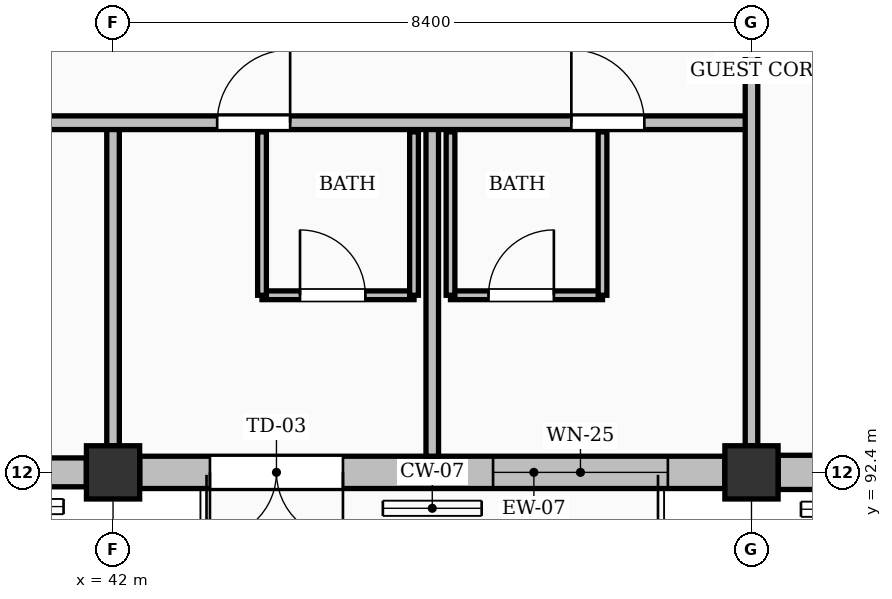
"""IFC4 building model, lengths in metres.
Left out: names, types, materials, properties, quantities, classifications, styles, units other than length and angle.
Written with IfcOpenShell. Run it as: python <this file> out.ifc"""

import sys

from ifc_helpers import new_model, si_unit, direction, frame, frame_2d, origin, origin_2d, place, context, subcontext, project, spatial, rectangle, extrude, element, fill, save


model = new_model("IFC4")
c1 = context("Model", 3, precision=1e-05, world=origin(), true_north=direction((0.0, 1.0)))
c2 = subcontext(c1, "Body", "Model", "MODEL_VIEW")
j1 = project(units=[si_unit("LENGTHUNIT", "METRE"), si_unit("PLANEANGLEUNIT", "RADIAN")], contexts=[c1])
p1 = place(None, origin())
s1 = spatial("IfcSite", under=j1, at=p1, CompositionType="ELEMENT")
p2 = place(p1, origin())
s2 = spatial("IfcBuilding", under=s1, at=p2, CompositionType="ELEMENT")
p3 = place(p2, frame((0.0, 0.0, 25.2)))
s3 = spatial("IfcBuildingStorey", under=s2, at=p3, CompositionType="ELEMENT", Elevation=25.2)
for number, where, z_axis, x_axis in (
    (1, (42.0, 92.4, 0.0), (0.0, 0.0, 1.0), (1.0, 0.0, 0.0)),
    (2, (50.4, 92.4, 0.0), (0.0, 0.0, 1.0), (1.0, 0.0, 0.0)),
):
    element("IfcColumn", number, at=place(p3, frame(where, z_axis=z_axis, x_axis=x_axis)), inside=s3, PredefinedType="COLUMN", context=c2, shape_type="SweptSolid", body=[
        extrude(rectangle(XDim=0.7, YDim=0.7, at=origin_2d()), origin(), (0.0, 0.0, 1.0), 3.36),
    ])
p4 = place(p3, frame((33.951, 92.4, 0.0), z_axis=(0.0, 0.0, 1.0), x_axis=(1.0, 0.0, 0.0)))
e3 = element("IfcWall", 3, at=p4, inside=s3, PredefinedType="SOLIDWALL", context=c2, shape_type="SweptSolid", body=[
    extrude(rectangle(XDim=7.698, YDim=0.38, at=frame_2d((3.849, 0.0))), origin(), (0.0, 0.0, 1.0), 2.494),
])
p5 = place(p4, frame((0.624, 0.0, 0.25)))
e4 = element("IfcOpeningElement", 4, at=p5, cuts=e3, PredefinedType="OPENING", context=c2, shape_type="SweptSolid", body=[
    extrude(rectangle(XDim=2.25, YDim=2.05, at=frame_2d((1.125, 1.025))), frame((0.0, 0.2, 0.0), z_axis=(0.0, -1.0, 0.0), x_axis=(1.0, 0.0, 0.0)), (0.0, 0.0, 1.0), 0.4),
])
p6 = place(p4, frame((4.799, 0.0, 0.25)))
e5 = element("IfcOpeningElement", 5, at=p6, cuts=e3, PredefinedType="OPENING", context=c2, shape_type="SweptSolid", body=[
    extrude(rectangle(XDim=2.3, YDim=1.75, at=frame_2d((1.15, 0.875))), frame((0.0, 0.2, 0.0), z_axis=(0.0, -1.0, 0.0), x_axis=(1.0, 0.0, 0.0)), (0.0, 0.0, 1.0), 0.4),
])
p7 = place(p3, frame((42.351, 92.4, 0.0), z_axis=(0.0, 0.0, 1.0), x_axis=(1.0, 0.0, 0.0)))
e6 = element("IfcWall", 6, at=p7, inside=s3, PredefinedType="SOLIDWALL", context=c2, shape_type="SweptSolid", body=[
    extrude(rectangle(XDim=7.698, YDim=0.425, at=frame_2d((3.849, 0.0))), origin(), (0.0, 0.0, 1.0), 2.494),
])
p8 = place(p7, frame((0.924, 0.0, 0.0)))
e7 = element("IfcOpeningElement", 7, at=p8, cuts=e6, PredefinedType="OPENING", context=c2, shape_type="SweptSolid", body=[
    extrude(rectangle(XDim=1.75, YDim=2.08, at=frame_2d((0.875, 1.04))), frame((0.0, 0.223, 0.0), z_axis=(0.0, -1.0, 0.0), x_axis=(1.0, 0.0, 0.0)), (0.0, 0.0, 1.0), 0.445),
])
p9 = place(p7, frame((4.649, 0.0, 0.25)))
e8 = element("IfcOpeningElement", 8, at=p9, cuts=e6, PredefinedType="OPENING", context=c2, shape_type="SweptSolid", body=[
    extrude(rectangle(XDim=2.3, YDim=1.75, at=frame_2d((1.15, 0.875))), frame((0.0, 0.223, 0.0), z_axis=(0.0, -1.0, 0.0), x_axis=(1.0, 0.0, 0.0)), (0.0, 0.0, 1.0), 0.445),
])
p10 = place(p3, frame((50.751, 92.4, 0.0), z_axis=(0.0, 0.0, 1.0), x_axis=(1.0, 0.0, 0.0)))
e9 = element("IfcWall", 9, at=p10, inside=s3, PredefinedType="SOLIDWALL", context=c2, shape_type="SweptSolid", body=[
    extrude(rectangle(XDim=7.698, YDim=0.45, at=frame_2d((3.849, 0.0))), origin(), (0.0, 0.0, 1.0), 2.494),
])
p11 = place(p10, frame((0.549, 0.0, 0.25)))
e10 = element("IfcOpeningElement", 10, at=p11, cuts=e9, PredefinedType="OPENING", context=c2, shape_type="SweptSolid", body=[
    extrude(rectangle(XDim=2.4, YDim=1.75, at=frame_2d((1.2, 0.875))), frame((0.0, 0.235, 0.0), z_axis=(0.0, -1.0, 0.0), x_axis=(1.0, 0.0, 0.0)), (0.0, 0.0, 1.0), 0.47),
])
p12 = place(p10, frame((4.789, 0.0, 0.25)))
e11 = element("IfcOpeningElement", 11, at=p12, cuts=e9, PredefinedType="OPENING", context=c2, shape_type="SweptSolid", body=[
    extrude(rectangle(XDim=2.32, YDim=1.9, at=frame_2d((1.16, 0.95))), frame((0.0, 0.235, 0.0), z_axis=(0.0, -1.0, 0.0), x_axis=(1.0, 0.0, 0.0)), (0.0, 0.0, 1.0), 0.47),
])
p13 = place(p3, frame((43.96, 94.73, 0.0), z_axis=(0.0, 0.0, 1.0), x_axis=(1.0, 0.0, 0.0)))
e12 = element("IfcWall", 12, at=p13, inside=s3, PredefinedType="PARTITIONING", context=c2, shape_type="SweptSolid", body=[
    extrude(rectangle(XDim=2.0, YDim=0.115, at=frame_2d((1.0, 0.0))), origin(), (0.0, 0.0, 1.0), 3.12),
])
p14 = place(p13, frame((0.5, 0.0, 0.0)))
e13 = element("IfcOpeningElement", 13, at=p14, cuts=e12, PredefinedType="OPENING", context=c2, shape_type="SweptSolid", body=[
    extrude(rectangle(XDim=0.86, YDim=2.05, at=frame_2d((0.43, 1.025))), frame((0.0, 0.067, 0.0), z_axis=(0.0, -1.0, 0.0), x_axis=(1.0, 0.0, 0.0)), (0.0, 0.0, 1.0), 0.135),
])
p15 = place(p3, frame((43.96, 94.73, 0.0), z_axis=(0.0, 0.0, 1.0), x_axis=(0.0, 1.0, 0.0)))
e14 = element("IfcWall", 14, at=p15, inside=s3, PredefinedType="PARTITIONING", context=c2, shape_type="SweptSolid", body=[
    extrude(rectangle(XDim=2.15, YDim=0.115, at=frame_2d((1.075, 0.0))), origin(), (0.0, 0.0, 1.0), 2.642),
])
p16 = place(p3, frame((45.96, 94.73, 0.0), z_axis=(0.0, 0.0, 1.0), x_axis=(0.0, 1.0, 0.0)))
e15 = element("IfcWall", 15, at=p16, inside=s3, PredefinedType="PARTITIONING", context=c2, shape_type="SweptSolid", body=[
    extrude(rectangle(XDim=2.15, YDim=0.115, at=frame_2d((1.075, 0.0))), origin(), (0.0, 0.0, 1.0), 3.12),
])
p17 = place(p3, frame((46.44, 94.73, 0.0), z_axis=(0.0, 0.0, 1.0), x_axis=(1.0, 0.0, 0.0)))
e16 = element("IfcWall", 16, at=p17, inside=s3, PredefinedType="PARTITIONING", context=c2, shape_type="SweptSolid", body=[
    extrude(rectangle(XDim=2.0, YDim=0.115, at=frame_2d((1.0, 0.0))), origin(), (0.0, 0.0, 1.0), 3.12),
])
p18 = place(p17, frame((0.5, 0.0, 0.0)))
e17 = element("IfcOpeningElement", 17, at=p18, cuts=e16, PredefinedType="OPENING", context=c2, shape_type="SweptSolid", body=[
    extrude(rectangle(XDim=0.86, YDim=2.05, at=frame_2d((0.43, 1.025))), frame((0.0, 0.067, 0.0), z_axis=(0.0, -1.0, 0.0), x_axis=(1.0, 0.0, 0.0)), (0.0, 0.0, 1.0), 0.135),
])
p19 = place(p3, frame((46.44, 94.73, 0.0), z_axis=(0.0, 0.0, 1.0), x_axis=(0.0, 1.0, 0.0)))
e18 = element("IfcWall", 18, at=p19, inside=s3, PredefinedType="PARTITIONING", context=c2, shape_type="SweptSolid", body=[
    extrude(rectangle(XDim=2.15, YDim=0.115, at=frame_2d((1.075, 0.0))), origin(), (0.0, 0.0, 1.0), 3.12),
])
p20 = place(p3, frame((48.44, 94.73, 0.0), z_axis=(0.0, 0.0, 1.0), x_axis=(0.0, 1.0, 0.0)))
e19 = element("IfcWall", 19, at=p20, inside=s3, PredefinedType="PARTITIONING", context=c2, shape_type="SweptSolid", body=[
    extrude(rectangle(XDim=2.15, YDim=0.115, at=frame_2d((1.075, 0.0))), origin(), (0.0, 0.0, 1.0), 2.642),
])
p21 = place(p3, frame((46.2, 92.613, 0.0), z_axis=(0.0, 0.0, 1.0), x_axis=(0.0, 1.0, 0.0)))
e20 = element("IfcWall", 20, at=p21, inside=s3, PredefinedType="PARTITIONING", context=c2, shape_type="SweptSolid", body=[
    extrude(rectangle(XDim=4.387, YDim=0.165, at=frame_2d((2.194, 0.0))), origin(), (0.0, 0.0, 1.0), 3.12),
])
p22 = place(p3, frame((42.0, 92.75, 0.0), z_axis=(0.0, 0.0, 1.0), x_axis=(0.0, 1.0, 0.0)))
e21 = element("IfcWall", 21, at=p22, inside=s3, PredefinedType="PARTITIONING", context=c2, shape_type="SweptSolid", body=[
    extrude(rectangle(XDim=4.25, YDim=0.165, at=frame_2d((2.125, 0.0))), origin(), (0.0, 0.0, 1.0), 2.455),
])
p23 = place(p3, frame((0.14, 97.0, 0.0), z_axis=(0.0, 0.0, 1.0), x_axis=(1.0, 0.0, 0.0)))
e22 = element("IfcWall", 22, at=p23, inside=s3, PredefinedType="PARTITIONING", context=c2, shape_type="SweptSolid", body=[
    extrude(rectangle(XDim=50.26, YDim=0.18, at=frame_2d((25.13, 0.0))), origin(), (0.0, 0.0, 1.0), 3.12),
])
p24 = place(p23, frame((1.23, 0.0, 0.0)))
e23 = element("IfcOpeningElement", 23, at=p24, cuts=e22, PredefinedType="OPENING", context=c2, shape_type="SweptSolid", body=[
    extrude(rectangle(XDim=0.96, YDim=2.15, at=frame_2d((0.48, 1.075))), frame((0.0, 0.1, 0.0), z_axis=(0.0, -1.0, 0.0), x_axis=(1.0, 0.0, 0.0)), (0.0, 0.0, 1.0), 0.2),
])
p25 = place(p23, frame((5.89, 0.0, 0.0)))
e24 = element("IfcOpeningElement", 24, at=p25, cuts=e22, PredefinedType="OPENING", context=c2, shape_type="SweptSolid", body=[
    extrude(rectangle(XDim=0.96, YDim=2.15, at=frame_2d((0.48, 1.075))), frame((0.0, 0.1, 0.0), z_axis=(0.0, -1.0, 0.0), x_axis=(1.0, 0.0, 0.0)), (0.0, 0.0, 1.0), 0.2),
])
p26 = place(p23, frame((11.66, 0.0, 0.0)))
e25 = element("IfcOpeningElement", 25, at=p26, cuts=e22, PredefinedType="OPENING", context=c2, shape_type="SweptSolid", body=[
    extrude(rectangle(XDim=1.62, YDim=2.2, at=frame_2d((0.81, 1.1))), frame((0.0, 0.1, 0.0), z_axis=(0.0, -1.0, 0.0), x_axis=(1.0, 0.0, 0.0)), (0.0, 0.0, 1.0), 0.2),
])
p27 = place(p23, frame((18.03, 0.0, 0.0)))
e26 = element("IfcOpeningElement", 26, at=p27, cuts=e22, PredefinedType="OPENING", context=c2, shape_type="SweptSolid", body=[
    extrude(rectangle(XDim=0.96, YDim=2.15, at=frame_2d((0.48, 1.075))), frame((0.0, 0.1, 0.0), z_axis=(0.0, -1.0, 0.0), x_axis=(1.0, 0.0, 0.0)), (0.0, 0.0, 1.0), 0.2),
])
p28 = place(p23, frame((22.69, 0.0, 0.0)))
e27 = element("IfcOpeningElement", 27, at=p28, cuts=e22, PredefinedType="OPENING", context=c2, shape_type="SweptSolid", body=[
    extrude(rectangle(XDim=0.96, YDim=2.15, at=frame_2d((0.48, 1.075))), frame((0.0, 0.1, 0.0), z_axis=(0.0, -1.0, 0.0), x_axis=(1.0, 0.0, 0.0)), (0.0, 0.0, 1.0), 0.2),
])
p29 = place(p23, frame((26.43, 0.0, 0.0)))
e28 = element("IfcOpeningElement", 28, at=p29, cuts=e22, PredefinedType="OPENING", context=c2, shape_type="SweptSolid", body=[
    extrude(rectangle(XDim=0.96, YDim=2.15, at=frame_2d((0.48, 1.075))), frame((0.0, 0.1, 0.0), z_axis=(0.0, -1.0, 0.0), x_axis=(1.0, 0.0, 0.0)), (0.0, 0.0, 1.0), 0.2),
])
p30 = place(p23, frame((31.09, 0.0, 0.0)))
e29 = element("IfcOpeningElement", 29, at=p30, cuts=e22, PredefinedType="OPENING", context=c2, shape_type="SweptSolid", body=[
    extrude(rectangle(XDim=0.96, YDim=2.15, at=frame_2d((0.48, 1.075))), frame((0.0, 0.1, 0.0), z_axis=(0.0, -1.0, 0.0), x_axis=(1.0, 0.0, 0.0)), (0.0, 0.0, 1.0), 0.2),
])
p31 = place(p23, frame((34.83, 0.0, 0.0)))
e30 = element("IfcOpeningElement", 30, at=p31, cuts=e22, PredefinedType="OPENING", context=c2, shape_type="SweptSolid", body=[
    extrude(rectangle(XDim=0.96, YDim=2.15, at=frame_2d((0.48, 1.075))), frame((0.0, 0.1, 0.0), z_axis=(0.0, -1.0, 0.0), x_axis=(1.0, 0.0, 0.0)), (0.0, 0.0, 1.0), 0.2),
])
p32 = place(p23, frame((39.49, 0.0, 0.0)))
e31 = element("IfcOpeningElement", 31, at=p32, cuts=e22, PredefinedType="OPENING", context=c2, shape_type="SweptSolid", body=[
    extrude(rectangle(XDim=0.96, YDim=2.15, at=frame_2d((0.48, 1.075))), frame((0.0, 0.1, 0.0), z_axis=(0.0, -1.0, 0.0), x_axis=(1.0, 0.0, 0.0)), (0.0, 0.0, 1.0), 0.2),
])
p33 = place(p23, frame((43.23, 0.0, 0.0)))
e32 = element("IfcOpeningElement", 32, at=p33, cuts=e22, PredefinedType="OPENING", context=c2, shape_type="SweptSolid", body=[
    extrude(rectangle(XDim=0.96, YDim=2.15, at=frame_2d((0.48, 1.075))), frame((0.0, 0.1, 0.0), z_axis=(0.0, -1.0, 0.0), x_axis=(1.0, 0.0, 0.0)), (0.0, 0.0, 1.0), 0.2),
])
p34 = place(p23, frame((47.89, 0.0, 0.0)))
e33 = element("IfcOpeningElement", 33, at=p34, cuts=e22, PredefinedType="OPENING", context=c2, shape_type="SweptSolid", body=[
    extrude(rectangle(XDim=0.96, YDim=2.15, at=frame_2d((0.48, 1.075))), frame((0.0, 0.1, 0.0), z_axis=(0.0, -1.0, 0.0), x_axis=(1.0, 0.0, 0.0)), (0.0, 0.0, 1.0), 0.2),
])
p35 = place(p3, frame((50.4, 92.75, 0.0), z_axis=(0.0, 0.0, 1.0), x_axis=(0.0, 1.0, 0.0)))
e34 = element("IfcWall", 34, at=p35, inside=s3, PredefinedType="PARTITIONING", context=c2, shape_type="SweptSolid", body=[
    extrude(rectangle(XDim=12.35, YDim=0.165, at=frame_2d((6.175, 0.0))), origin(), (0.0, 0.0, 1.0), 2.455),
])
p36 = place(p8, frame((1.75, 0.0, 0.0), z_axis=(0.0, 0.0, 1.0), x_axis=(-1.0, 0.0, 0.0)))
e35 = element("IfcDoor", 35, at=p36, inside=s3, OperationType="DOUBLE_DOOR_SINGLE_SWING", PredefinedType="DOOR", context=c2, shape_type="SweptSolid", body=[
    extrude(rectangle(XDim=1.75, YDim=2.08, at=frame_2d((0.875, 1.04))), frame((0.0, 0.025, 0.0), z_axis=(0.0, -1.0, 0.0), x_axis=(1.0, 0.0, 0.0)), (0.0, 0.0, 1.0), 0.05),
])
fill(e7, e35)
p37 = place(p9, origin())
e36 = element("IfcWindow", 36, at=p37, inside=s3, PartitioningType="DOUBLE_PANEL_VERTICAL", PredefinedType="WINDOW", context=c2, shape_type="SweptSolid", body=[
    extrude(rectangle(XDim=2.3, YDim=1.75, at=frame_2d((1.15, 0.875))), frame((0.0, 0.03, 0.0), z_axis=(0.0, -1.0, 0.0), x_axis=(1.0, 0.0, 0.0)), (0.0, 0.0, 1.0), 0.06),
])
fill(e8, e36)
p38 = place(p14, origin())
e37 = element("IfcDoor", 37, at=p38, inside=s3, OperationType="SINGLE_SWING_LEFT", PredefinedType="DOOR", context=c2, shape_type="SweptSolid", body=[
    extrude(rectangle(XDim=0.86, YDim=2.05, at=frame_2d((0.43, 1.025))), frame((0.0, 0.025, 0.0), z_axis=(0.0, -1.0, 0.0), x_axis=(1.0, 0.0, 0.0)), (0.0, 0.0, 1.0), 0.05),
])
fill(e13, e37)
p39 = place(p18, origin())
e38 = element("IfcDoor", 38, at=p39, inside=s3, OperationType="SINGLE_SWING_RIGHT", PredefinedType="DOOR", context=c2, shape_type="SweptSolid", body=[
    extrude(rectangle(XDim=0.86, YDim=2.05, at=frame_2d((0.43, 1.025))), frame((0.0, 0.025, 0.0), z_axis=(0.0, -1.0, 0.0), x_axis=(1.0, 0.0, 0.0)), (0.0, 0.0, 1.0), 0.05),
])
fill(e17, e38)
p40 = place(p33, origin())
e39 = element("IfcDoor", 39, at=p40, inside=s3, OperationType="SINGLE_SWING_RIGHT", PredefinedType="DOOR", context=c2, shape_type="SweptSolid", body=[
    extrude(rectangle(XDim=0.96, YDim=2.15, at=frame_2d((0.48, 1.075))), frame((0.0, 0.025, 0.0), z_axis=(0.0, -1.0, 0.0), x_axis=(1.0, 0.0, 0.0)), (0.0, 0.0, 1.0), 0.05),
])
fill(e32, e39)
p41 = place(p34, origin())
e40 = element("IfcDoor", 40, at=p41, inside=s3, OperationType="SINGLE_SWING_LEFT", PredefinedType="DOOR", context=c2, shape_type="SweptSolid", body=[
    extrude(rectangle(XDim=0.96, YDim=2.15, at=frame_2d((0.48, 1.075))), frame((0.0, 0.025, 0.0), z_axis=(0.0, -1.0, 0.0), x_axis=(1.0, 0.0, 0.0)), (0.0, 0.0, 1.0), 0.05),
])
fill(e33, e40)
save(model, sys.argv[1])
